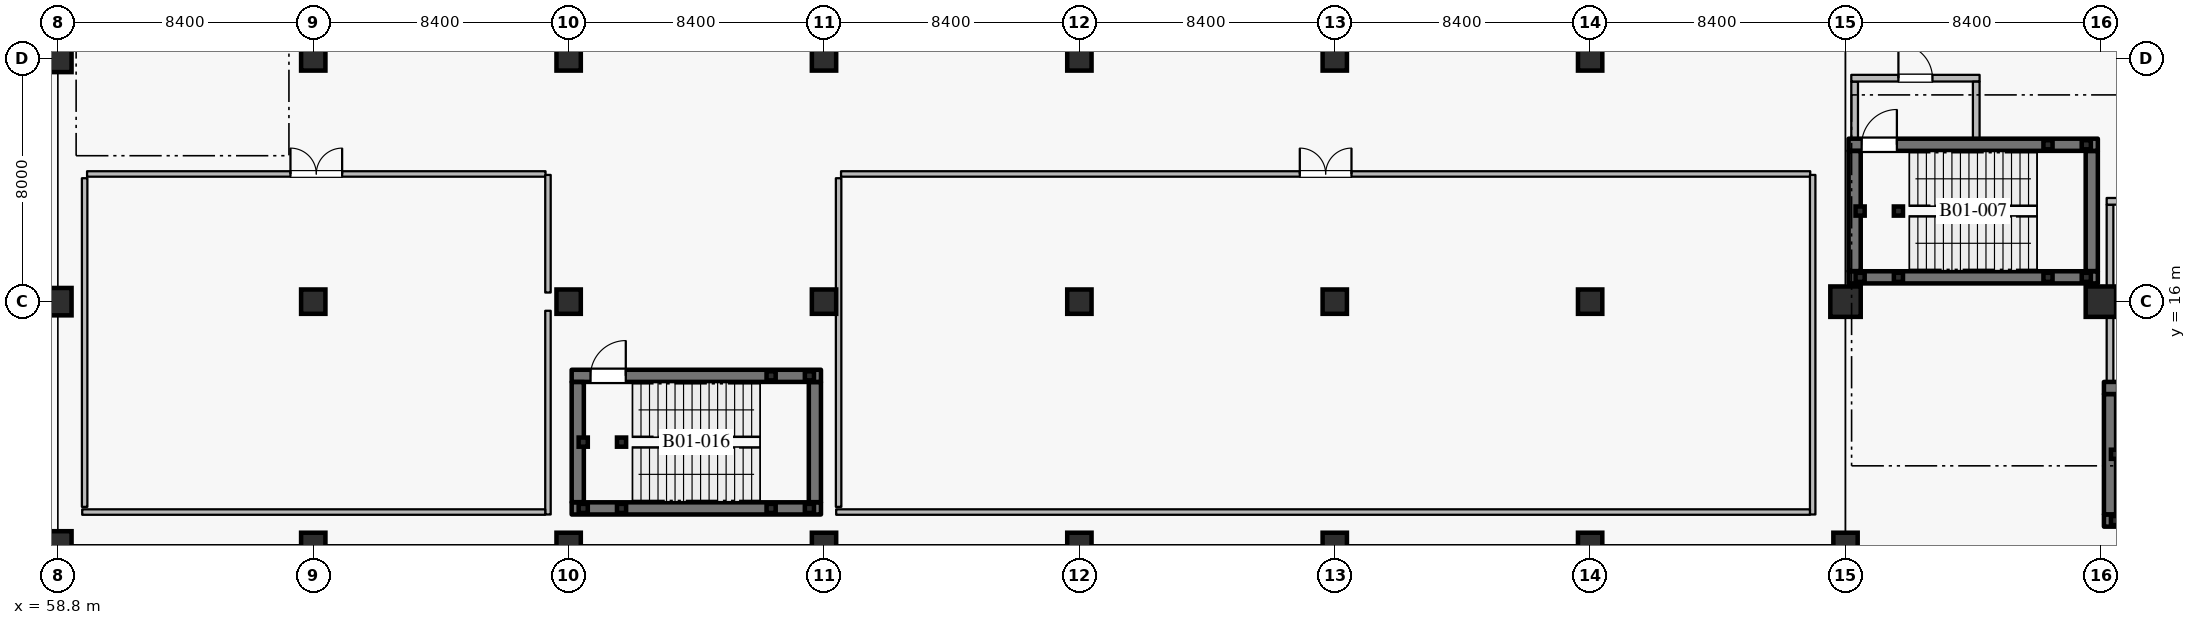
"""IFC4 building model, lengths in metres.
Left out: names, types, materials, properties, quantities, classifications, styles, units other than length and angle.
Written with IfcOpenShell. Run it as: python <this file> out.ifc"""

import sys

from ifc_helpers import new_model, si_unit, direction, frame, frame_2d, origin, origin_2d, place, context, subcontext, project, spatial, rectangle, hollow_rectangle, extrude, element, fill, save


model = new_model("IFC4")
c1 = context("Model", 3, precision=1e-05, world=origin(), true_north=direction((0.0, 1.0)))
c2 = subcontext(c1, "Body", "Model", "MODEL_VIEW")
j1 = project(units=[si_unit("LENGTHUNIT", "METRE"), si_unit("PLANEANGLEUNIT", "RADIAN")], contexts=[c1])
p1 = place(None, origin())
s1 = spatial("IfcSite", under=j1, at=p1, CompositionType="ELEMENT")
p2 = place(p1, origin())
s2 = spatial("IfcBuilding", under=s1, at=p2, CompositionType="ELEMENT")
p3 = place(p2, frame((0.0, 0.0, -5.4)))
s3 = spatial("IfcBuildingStorey", under=s2, at=p3, CompositionType="ELEMENT", Elevation=-5.4)
for number, where, z_axis, x_axis in (
    (1, (58.8, 8.0, 0.0), (0.0, 0.0, 1.0), (1.0, 0.0, 0.0)),
    (2, (58.8, 16.0, 0.0), (0.0, 0.0, 1.0), (1.0, 0.0, 0.0)),
    (3, (58.8, 24.0, 0.0), (0.0, 0.0, 1.0), (1.0, 0.0, 0.0)),
):
    element("IfcColumn", number, at=place(p3, frame(where, z_axis=z_axis, x_axis=x_axis)), inside=s3, PredefinedType="COLUMN", context=c2, shape_type="SweptSolid", body=[
        extrude(rectangle(XDim=0.9, YDim=0.9, at=origin_2d()), origin(), (0.0, 0.0, 1.0), 5.4),
    ])
for number, where, z_axis, x_axis in (
    (4, (67.2, 8.0, 0.0), (0.0, 0.0, 1.0), (1.0, 0.0, 0.0)),
    (5, (67.2, 16.0, 0.0), (0.0, 0.0, 1.0), (1.0, 0.0, 0.0)),
    (6, (67.2, 24.0, 0.0), (0.0, 0.0, 1.0), (1.0, 0.0, 0.0)),
    (7, (75.6, 8.0, 0.0), (0.0, 0.0, 1.0), (1.0, 0.0, 0.0)),
    (8, (75.6, 16.0, 0.0), (0.0, 0.0, 1.0), (1.0, 0.0, 0.0)),
    (9, (75.6, 24.0, 0.0), (0.0, 0.0, 1.0), (1.0, 0.0, 0.0)),
    (10, (84.0, 8.0, 0.0), (0.0, 0.0, 1.0), (1.0, 0.0, 0.0)),
    (11, (84.0, 16.0, 0.0), (0.0, 0.0, 1.0), (1.0, 0.0, 0.0)),
    (12, (84.0, 24.0, 0.0), (0.0, 0.0, 1.0), (1.0, 0.0, 0.0)),
    (13, (92.4, 8.0, 0.0), (0.0, 0.0, 1.0), (1.0, 0.0, 0.0)),
    (14, (92.4, 16.0, 0.0), (0.0, 0.0, 1.0), (1.0, 0.0, 0.0)),
    (15, (92.4, 24.0, 0.0), (0.0, 0.0, 1.0), (1.0, 0.0, 0.0)),
    (16, (100.8, 8.0, 0.0), (0.0, 0.0, 1.0), (1.0, 0.0, 0.0)),
    (17, (100.8, 16.0, 0.0), (0.0, 0.0, 1.0), (1.0, 0.0, 0.0)),
    (18, (100.8, 24.0, 0.0), (0.0, 0.0, 1.0), (1.0, 0.0, 0.0)),
    (19, (109.2, 8.0, 0.0), (0.0, 0.0, 1.0), (1.0, 0.0, 0.0)),
    (20, (109.2, 16.0, 0.0), (0.0, 0.0, 1.0), (1.0, 0.0, 0.0)),
    (21, (109.2, 24.0, 0.0), (0.0, 0.0, 1.0), (1.0, 0.0, 0.0)),
    (22, (117.6, 8.0, 0.0), (0.0, 0.0, 1.0), (1.0, 0.0, 0.0)),
):
    element("IfcColumn", number, at=place(p3, frame(where, z_axis=z_axis, x_axis=x_axis)), inside=s3, PredefinedType="COLUMN", context=c2, shape_type="SweptSolid", body=[
        extrude(rectangle(XDim=0.8, YDim=0.8, at=origin_2d()), origin(), (0.0, 0.0, 1.0), 5.4),
    ])
for number, where, z_axis, x_axis in (
    (23, (117.6, 16.0, 0.0), (0.0, 0.0, 1.0), (1.0, 0.0, 0.0)),
    (24, (126.0, 16.0, 0.0), (0.0, 0.0, 1.0), (1.0, 0.0, 0.0)),
):
    element("IfcColumn", number, at=place(p3, frame(where, z_axis=z_axis, x_axis=x_axis)), inside=s3, PredefinedType="COLUMN", context=c2, shape_type="SweptSolid", body=[
        extrude(rectangle(XDim=1.0, YDim=1.0, at=origin_2d()), origin(), (0.0, 0.0, 1.0), 5.4),
    ])
p4 = place(p3, frame((126.1, 8.8, 0.0), z_axis=(0.0, 0.0, 1.0), x_axis=(1.0, 0.0, 0.0)))
e25 = element("IfcWall", 25, at=p4, inside=s3, PredefinedType="SHEAR", context=c2, shape_type="SweptSolid", body=[
    extrude(rectangle(XDim=8.2, YDim=0.4, at=frame_2d((4.1, 0.0))), origin(), (0.0, 0.0, 1.0), 4.995),
])
p5 = place(p3, frame((126.1, 13.16, 0.0), z_axis=(0.0, 0.0, 1.0), x_axis=(1.0, 0.0, 0.0)))
e26 = element("IfcWall", 26, at=p5, inside=s3, PredefinedType="SHEAR", context=c2, shape_type="SweptSolid", body=[
    extrude(rectangle(XDim=8.2, YDim=0.4, at=frame_2d((4.1, 0.0))), origin(), (0.0, 0.0, 1.0), 4.995),
])
p6 = place(p5, frame((0.43, 0.0, 0.0)))
e27 = element("IfcOpeningElement", 27, at=p6, cuts=e26, PredefinedType="OPENING", context=c2, shape_type="SweptSolid", body=[
    extrude(rectangle(XDim=1.16, YDim=2.2, at=frame_2d((0.58, 1.1))), frame((0.0, 0.21, 0.0), z_axis=(0.0, -1.0, 0.0), x_axis=(1.0, 0.0, 0.0)), (0.0, 0.0, 1.0), 0.42),
])
p7 = place(p3, frame((126.3, 9.005, 0.0), z_axis=(0.0, 0.0, 1.0), x_axis=(0.0, 1.0, 0.0)))
e28 = element("IfcWall", 28, at=p7, inside=s3, PredefinedType="SHEAR", context=c2, shape_type="SweptSolid", body=[
    extrude(rectangle(XDim=3.95, YDim=0.4, at=frame_2d((1.975, 0.0))), origin(), (0.0, 0.0, 1.0), 4.995),
])
p8 = place(p3, frame((126.3, 13.365, 0.0), z_axis=(0.0, 0.0, 1.0), x_axis=(0.0, 1.0, 0.0)))
e29 = element("IfcWall", 29, at=p8, inside=s3, PredefinedType="PARTITIONING", context=c2, shape_type="SweptSolid", body=[
    extrude(rectangle(XDim=5.82, YDim=0.22, at=frame_2d((2.91, 0.0))), origin(), (0.0, 0.0, 1.0), 4.05),
])
p9 = place(p3, frame((126.19, 19.3, 0.0), z_axis=(0.0, 0.0, 1.0), x_axis=(1.0, 0.0, 0.0)))
e30 = element("IfcWall", 30, at=p9, inside=s3, PredefinedType="PARTITIONING", context=c2, shape_type="SweptSolid", body=[
    extrude(rectangle(XDim=3.82, YDim=0.22, at=frame_2d((1.91, 0.0))), origin(), (0.0, 0.0, 1.0), 4.995),
])
p10 = place(p9, frame((1.35, 0.0, 0.0)))
e31 = element("IfcOpeningElement", 31, at=p10, cuts=e30, PredefinedType="OPENING", context=c2, shape_type="SweptSolid", body=[
    extrude(rectangle(XDim=1.12, YDim=2.2, at=frame_2d((0.56, 1.1))), frame((0.0, 0.12, 0.0), z_axis=(0.0, -1.0, 0.0), x_axis=(1.0, 0.0, 0.0)), (0.0, 0.0, 1.0), 0.24),
])
for number, where, z_axis, x_axis in (
    (32, (126.48, 8.8, 0.0), (0.0, 0.0, 1.0), (1.0, 0.0, 0.0)),
    (33, (126.48, 10.98, 0.0), (0.0, 0.0, 1.0), (1.0, 0.0, 0.0)),
):
    element("IfcColumn", number, at=place(p3, frame(where, z_axis=z_axis, x_axis=x_axis)), inside=s3, PredefinedType="COLUMN", context=c2, shape_type="SweptSolid", body=[
        extrude(hollow_rectangle(XDim=0.3, YDim=0.3, WallThickness=0.012, at=origin_2d()), origin(), (0.0, 0.0, 1.0), 5.22),
    ])
p11 = place(p3, frame((117.7, 16.8, 0.0), z_axis=(0.0, 0.0, 1.0), x_axis=(1.0, 0.0, 0.0)))
e34 = element("IfcWall", 34, at=p11, inside=s3, PredefinedType="SHEAR", context=c2, shape_type="SweptSolid", body=[
    extrude(rectangle(XDim=8.2, YDim=0.4, at=frame_2d((4.1, 0.0))), origin(), (0.0, 0.0, 1.0), 4.995),
])
p12 = place(p3, frame((125.7, 17.005, 0.0), z_axis=(0.0, 0.0, 1.0), x_axis=(0.0, 1.0, 0.0)))
e35 = element("IfcWall", 35, at=p12, inside=s3, PredefinedType="SHEAR", context=c2, shape_type="SweptSolid", body=[
    extrude(rectangle(XDim=3.95, YDim=0.4, at=frame_2d((1.975, 0.0))), origin(), (0.0, 0.0, 1.0), 4.995),
])
p13 = place(p3, frame((117.7, 21.16, 0.0), z_axis=(0.0, 0.0, 1.0), x_axis=(1.0, 0.0, 0.0)))
e36 = element("IfcWall", 36, at=p13, inside=s3, PredefinedType="SHEAR", context=c2, shape_type="SweptSolid", body=[
    extrude(rectangle(XDim=8.2, YDim=0.4, at=frame_2d((4.1, 0.0))), origin(), (0.0, 0.0, 1.0), 4.995),
])
p14 = place(p13, frame((0.43, 0.0, 0.0)))
e37 = element("IfcOpeningElement", 37, at=p14, cuts=e36, PredefinedType="OPENING", context=c2, shape_type="SweptSolid", body=[
    extrude(rectangle(XDim=1.16, YDim=2.2, at=frame_2d((0.58, 1.1))), frame((0.0, 0.21, 0.0), z_axis=(0.0, -1.0, 0.0), x_axis=(1.0, 0.0, 0.0)), (0.0, 0.0, 1.0), 0.42),
])
p15 = place(p3, frame((117.9, 17.005, 0.0), z_axis=(0.0, 0.0, 1.0), x_axis=(0.0, 1.0, 0.0)))
e38 = element("IfcWall", 38, at=p15, inside=s3, PredefinedType="SHEAR", context=c2, shape_type="SweptSolid", body=[
    extrude(rectangle(XDim=3.95, YDim=0.4, at=frame_2d((1.975, 0.0))), origin(), (0.0, 0.0, 1.0), 4.995),
])
p16 = place(p3, frame((117.9, 21.365, 0.0), z_axis=(0.0, 0.0, 1.0), x_axis=(0.0, 1.0, 0.0)))
e39 = element("IfcWall", 39, at=p16, inside=s3, PredefinedType="PARTITIONING", context=c2, shape_type="SweptSolid", body=[
    extrude(rectangle(XDim=1.87, YDim=0.22, at=frame_2d((0.935, 0.0))), origin(), (0.0, 0.0, 1.0), 4.1),
])
p17 = place(p3, frame((117.79, 23.35, 0.0), z_axis=(0.0, 0.0, 1.0), x_axis=(1.0, 0.0, 0.0)))
e40 = element("IfcWall", 40, at=p17, inside=s3, PredefinedType="PARTITIONING", context=c2, shape_type="SweptSolid", body=[
    extrude(rectangle(XDim=4.22, YDim=0.22, at=frame_2d((2.11, 0.0))), origin(), (0.0, 0.0, 1.0), 4.995),
])
p18 = place(p17, frame((1.55, 0.0, 0.0)))
e41 = element("IfcOpeningElement", 41, at=p18, cuts=e40, PredefinedType="OPENING", context=c2, shape_type="SweptSolid", body=[
    extrude(rectangle(XDim=1.12, YDim=2.2, at=frame_2d((0.56, 1.1))), frame((0.0, 0.12, 0.0), z_axis=(0.0, -1.0, 0.0), x_axis=(1.0, 0.0, 0.0)), (0.0, 0.0, 1.0), 0.24),
])
p19 = place(p3, frame((121.9, 21.365, 0.0), z_axis=(0.0, 0.0, 1.0), x_axis=(0.0, 1.0, 0.0)))
e42 = element("IfcWall", 42, at=p19, inside=s3, PredefinedType="PARTITIONING", context=c2, shape_type="SweptSolid", body=[
    extrude(rectangle(XDim=1.87, YDim=0.22, at=frame_2d((0.935, 0.0))), origin(), (0.0, 0.0, 1.0), 4.995),
])
for number, where, z_axis, x_axis in (
    (43, (118.08, 16.8, 0.0), (0.0, 0.0, 1.0), (1.0, 0.0, 0.0)),
    (44, (118.08, 18.98, 0.0), (0.0, 0.0, 1.0), (1.0, 0.0, 0.0)),
    (45, (119.34, 16.8, 0.0), (0.0, 0.0, 1.0), (1.0, 0.0, 0.0)),
    (46, (119.34, 18.98, 0.0), (0.0, 0.0, 1.0), (1.0, 0.0, 0.0)),
):
    element("IfcColumn", number, at=place(p3, frame(where, z_axis=z_axis, x_axis=x_axis)), inside=s3, PredefinedType="COLUMN", context=c2, shape_type="SweptSolid", body=[
        extrude(hollow_rectangle(XDim=0.3, YDim=0.3, WallThickness=0.012, at=origin_2d()), origin(), (0.0, 0.0, 1.0), 5.22),
    ])
for number, where, z_axis, x_axis in (
    (47, (124.26, 16.8, 0.0), (0.0, 0.0, 1.0), (1.0, 0.0, 0.0)),
    (48, (124.26, 21.16, 0.0), (0.0, 0.0, 1.0), (1.0, 0.0, 0.0)),
    (49, (125.52, 16.8, 0.0), (0.0, 0.0, 1.0), (1.0, 0.0, 0.0)),
    (50, (125.52, 21.16, 0.0), (0.0, 0.0, 1.0), (1.0, 0.0, 0.0)),
):
    element("IfcColumn", number, at=place(p3, frame(where, z_axis=z_axis, x_axis=x_axis)), inside=s3, PredefinedType="COLUMN", context=c2, shape_type="SweptSolid", body=[
        extrude(hollow_rectangle(XDim=0.3, YDim=0.3, WallThickness=0.012, at=origin_2d()), origin(), (0.0, 0.0, 1.0), 2.52),
    ])
p20 = place(p3, frame((75.7, 9.2, 0.0), z_axis=(0.0, 0.0, 1.0), x_axis=(1.0, 0.0, 0.0)))
e51 = element("IfcWall", 51, at=p20, inside=s3, PredefinedType="SHEAR", context=c2, shape_type="SweptSolid", body=[
    extrude(rectangle(XDim=8.2, YDim=0.4, at=frame_2d((4.1, 0.0))), origin(), (0.0, 0.0, 1.0), 4.995),
])
p21 = place(p3, frame((83.7, 9.405, 0.0), z_axis=(0.0, 0.0, 1.0), x_axis=(0.0, 1.0, 0.0)))
e52 = element("IfcWall", 52, at=p21, inside=s3, PredefinedType="SHEAR", context=c2, shape_type="SweptSolid", body=[
    extrude(rectangle(XDim=3.95, YDim=0.4, at=frame_2d((1.975, 0.0))), origin(), (0.0, 0.0, 1.0), 4.995),
])
p22 = place(p3, frame((75.7, 13.56, 0.0), z_axis=(0.0, 0.0, 1.0), x_axis=(1.0, 0.0, 0.0)))
e53 = element("IfcWall", 53, at=p22, inside=s3, PredefinedType="SHEAR", context=c2, shape_type="SweptSolid", body=[
    extrude(rectangle(XDim=8.2, YDim=0.4, at=frame_2d((4.1, 0.0))), origin(), (0.0, 0.0, 1.0), 4.995),
])
p23 = place(p22, frame((0.62, 0.0, 0.0)))
e54 = element("IfcOpeningElement", 54, at=p23, cuts=e53, PredefinedType="OPENING", context=c2, shape_type="SweptSolid", body=[
    extrude(rectangle(XDim=1.16, YDim=2.2, at=frame_2d((0.58, 1.1))), frame((0.0, 0.21, 0.0), z_axis=(0.0, -1.0, 0.0), x_axis=(1.0, 0.0, 0.0)), (0.0, 0.0, 1.0), 0.42),
])
p24 = place(p3, frame((75.9, 9.405, 0.0), z_axis=(0.0, 0.0, 1.0), x_axis=(0.0, 1.0, 0.0)))
e55 = element("IfcWall", 55, at=p24, inside=s3, PredefinedType="SHEAR", context=c2, shape_type="SweptSolid", body=[
    extrude(rectangle(XDim=3.95, YDim=0.4, at=frame_2d((1.975, 0.0))), origin(), (0.0, 0.0, 1.0), 4.995),
])
for number, where, z_axis, x_axis in (
    (56, (76.08, 9.2, 0.0), (0.0, 0.0, 1.0), (1.0, 0.0, 0.0)),
    (57, (76.08, 11.38, 0.0), (0.0, 0.0, 1.0), (1.0, 0.0, 0.0)),
    (58, (77.34, 9.2, 0.0), (0.0, 0.0, 1.0), (1.0, 0.0, 0.0)),
    (59, (77.34, 11.38, 0.0), (0.0, 0.0, 1.0), (1.0, 0.0, 0.0)),
):
    element("IfcColumn", number, at=place(p3, frame(where, z_axis=z_axis, x_axis=x_axis)), inside=s3, PredefinedType="COLUMN", context=c2, shape_type="SweptSolid", body=[
        extrude(hollow_rectangle(XDim=0.3, YDim=0.3, WallThickness=0.012, at=origin_2d()), origin(), (0.0, 0.0, 1.0), 5.22),
    ])
for number, where, z_axis, x_axis in (
    (60, (82.26, 9.2, 0.0), (0.0, 0.0, 1.0), (1.0, 0.0, 0.0)),
    (61, (82.26, 13.56, 0.0), (0.0, 0.0, 1.0), (1.0, 0.0, 0.0)),
    (62, (83.52, 9.2, 0.0), (0.0, 0.0, 1.0), (1.0, 0.0, 0.0)),
    (63, (83.52, 13.56, 0.0), (0.0, 0.0, 1.0), (1.0, 0.0, 0.0)),
):
    element("IfcColumn", number, at=place(p3, frame(where, z_axis=z_axis, x_axis=x_axis)), inside=s3, PredefinedType="COLUMN", context=c2, shape_type="SweptSolid", body=[
        extrude(hollow_rectangle(XDim=0.3, YDim=0.3, WallThickness=0.012, at=origin_2d()), origin(), (0.0, 0.0, 1.0), 2.52),
    ])
p25 = place(p3, frame((59.76, 20.2, 0.0), z_axis=(0.0, 0.0, 1.0), x_axis=(1.0, 0.0, 0.0)))
e64 = element("IfcWall", 64, at=p25, inside=s3, PredefinedType="PARTITIONING", context=c2, shape_type="SweptSolid", body=[
    extrude(rectangle(XDim=15.08, YDim=0.18, at=frame_2d((7.54, 0.0))), origin(), (0.0, 0.0, 1.0), 4.995),
])
p26 = place(p25, frame((6.69, 0.0, 0.0)))
e65 = element("IfcOpeningElement", 65, at=p26, cuts=e64, PredefinedType="OPENING", context=c2, shape_type="SweptSolid", body=[
    extrude(rectangle(XDim=1.7, YDim=2.3, at=frame_2d((0.85, 1.15))), frame((0.0, 0.1, 0.0), z_axis=(0.0, -1.0, 0.0), x_axis=(1.0, 0.0, 0.0)), (0.0, 0.0, 1.0), 0.2),
])
p27 = place(p3, frame((59.68, 9.25, 0.0), z_axis=(0.0, 0.0, 1.0), x_axis=(0.0, 1.0, 0.0)))
e66 = element("IfcWall", 66, at=p27, inside=s3, PredefinedType="PARTITIONING", context=c2, shape_type="SweptSolid", body=[
    extrude(rectangle(XDim=10.81, YDim=0.18, at=frame_2d((5.405, 0.0))), origin(), (0.0, 0.0, 1.0), 4.995),
])
p28 = place(p3, frame((84.56, 20.2, 0.0), z_axis=(0.0, 0.0, 1.0), x_axis=(1.0, 0.0, 0.0)))
e67 = element("IfcWall", 67, at=p28, inside=s3, PredefinedType="PARTITIONING", context=c2, shape_type="SweptSolid", body=[
    extrude(rectangle(XDim=31.88, YDim=0.18, at=frame_2d((15.94, 0.0))), origin(), (0.0, 0.0, 1.0), 4.995),
])
p29 = place(p28, frame((15.09, 0.0, 0.0)))
e68 = element("IfcOpeningElement", 68, at=p29, cuts=e67, PredefinedType="OPENING", context=c2, shape_type="SweptSolid", body=[
    extrude(rectangle(XDim=1.7, YDim=2.3, at=frame_2d((0.85, 1.15))), frame((0.0, 0.1, 0.0), z_axis=(0.0, -1.0, 0.0), x_axis=(1.0, 0.0, 0.0)), (0.0, 0.0, 1.0), 0.2),
])
p30 = place(p3, frame((84.48, 9.25, 0.0), z_axis=(0.0, 0.0, 1.0), x_axis=(0.0, 1.0, 0.0)))
e69 = element("IfcWall", 69, at=p30, inside=s3, PredefinedType="PARTITIONING", context=c2, shape_type="SweptSolid", body=[
    extrude(rectangle(XDim=10.81, YDim=0.18, at=frame_2d((5.405, 0.0))), origin(), (0.0, 0.0, 1.0), 4.995),
])
p31 = place(p3, frame((74.92, 9.0, 0.0), z_axis=(0.0, 0.0, 1.0), x_axis=(0.0, 1.0, 0.0)))
e70 = element("IfcWall", 70, at=p31, inside=s3, PredefinedType="PARTITIONING", context=c2, shape_type="SweptSolid", body=[
    extrude(rectangle(XDim=6.7, YDim=0.18, at=frame_2d((3.35, 0.0))), origin(), (0.0, 0.0, 1.0), 4.995),
])
p32 = place(p3, frame((74.92, 16.3, 0.0), z_axis=(0.0, 0.0, 1.0), x_axis=(0.0, 1.0, 0.0)))
e71 = element("IfcWall", 71, at=p32, inside=s3, PredefinedType="PARTITIONING", context=c2, shape_type="SweptSolid", body=[
    extrude(rectangle(XDim=3.868, YDim=0.18, at=frame_2d((1.934, 0.0))), origin(), (0.0, 0.0, 1.0), 4.995),
])
p33 = place(p3, frame((59.6, 9.08, 0.0), z_axis=(0.0, 0.0, 1.0), x_axis=(1.0, 0.0, 0.0)))
e72 = element("IfcWall", 72, at=p33, inside=s3, PredefinedType="PARTITIONING", context=c2, shape_type="SweptSolid", body=[
    extrude(rectangle(XDim=15.23, YDim=0.18, at=frame_2d((7.615, 0.0))), origin(), (0.0, 0.0, 1.0), 4.995),
])
p34 = place(p3, frame((116.52, 9.0, 0.0), z_axis=(0.0, 0.0, 1.0), x_axis=(0.0, 1.0, 0.0)))
e73 = element("IfcWall", 73, at=p34, inside=s3, PredefinedType="PARTITIONING", context=c2, shape_type="SweptSolid", body=[
    extrude(rectangle(XDim=11.168, YDim=0.18, at=frame_2d((5.584, 0.0))), origin(), (0.0, 0.0, 1.0), 4.995),
])
p35 = place(p3, frame((84.4, 9.08, 0.0), z_axis=(0.0, 0.0, 1.0), x_axis=(1.0, 0.0, 0.0)))
e74 = element("IfcWall", 74, at=p35, inside=s3, PredefinedType="PARTITIONING", context=c2, shape_type="SweptSolid", body=[
    extrude(rectangle(XDim=32.03, YDim=0.18, at=frame_2d((16.015, 0.0))), origin(), (0.0, 0.0, 1.0), 4.995),
])
p36 = place(p14, origin())
e75 = element("IfcDoor", 75, at=p36, inside=s3, OperationType="SINGLE_SWING_RIGHT", PredefinedType="DOOR", context=c2, shape_type="SweptSolid", body=[
    extrude(rectangle(XDim=1.16, YDim=2.2, at=frame_2d((0.58, 1.1))), frame((0.0, 0.025, 0.0), z_axis=(0.0, -1.0, 0.0), x_axis=(1.0, 0.0, 0.0)), (0.0, 0.0, 1.0), 0.05),
])
fill(e37, e75)
p37 = place(p18, origin())
e76 = element("IfcDoor", 76, at=p37, inside=s3, OperationType="SINGLE_SWING_LEFT", PredefinedType="DOOR", context=c2, shape_type="SweptSolid", body=[
    extrude(rectangle(XDim=1.12, YDim=2.2, at=frame_2d((0.56, 1.1))), frame((0.0, 0.025, 0.0), z_axis=(0.0, -1.0, 0.0), x_axis=(1.0, 0.0, 0.0)), (0.0, 0.0, 1.0), 0.05),
])
fill(e41, e76)
p38 = place(p23, origin())
e77 = element("IfcDoor", 77, at=p38, inside=s3, OperationType="SINGLE_SWING_RIGHT", PredefinedType="DOOR", context=c2, shape_type="SweptSolid", body=[
    extrude(rectangle(XDim=1.16, YDim=2.2, at=frame_2d((0.58, 1.1))), frame((0.0, 0.025, 0.0), z_axis=(0.0, -1.0, 0.0), x_axis=(1.0, 0.0, 0.0)), (0.0, 0.0, 1.0), 0.05),
])
fill(e54, e77)
p39 = place(p26, origin())
e78 = element("IfcDoor", 78, at=p39, inside=s3, OperationType="DOUBLE_DOOR_SINGLE_SWING", PredefinedType="DOOR", context=c2, shape_type="SweptSolid", body=[
    extrude(rectangle(XDim=1.7, YDim=2.3, at=frame_2d((0.85, 1.15))), frame((0.0, 0.025, 0.0), z_axis=(0.0, -1.0, 0.0), x_axis=(1.0, 0.0, 0.0)), (0.0, 0.0, 1.0), 0.05),
])
fill(e65, e78)
p40 = place(p29, origin())
e79 = element("IfcDoor", 79, at=p40, inside=s3, OperationType="DOUBLE_DOOR_SINGLE_SWING", PredefinedType="DOOR", context=c2, shape_type="SweptSolid", body=[
    extrude(rectangle(XDim=1.7, YDim=2.3, at=frame_2d((0.85, 1.15))), frame((0.0, 0.025, 0.0), z_axis=(0.0, -1.0, 0.0), x_axis=(1.0, 0.0, 0.0)), (0.0, 0.0, 1.0), 0.05),
])
fill(e68, e79)
save(model, sys.argv[1])
